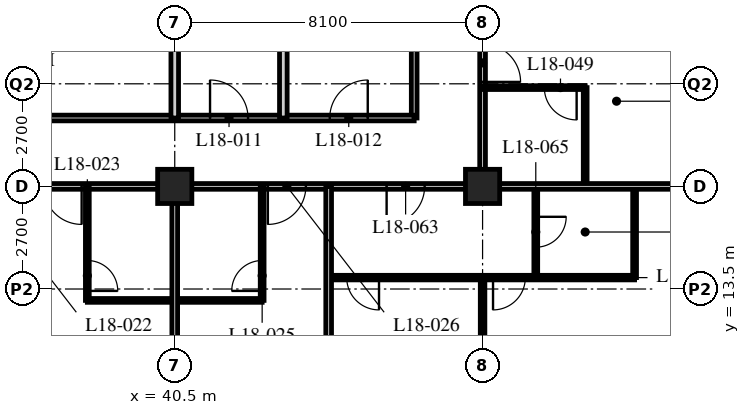
"""IFC4 building model, lengths in metres.
Left out: names, types, materials, properties, quantities, classifications, styles, units other than length and angle.
Written with IfcOpenShell. Run it as: python <this file> out.ifc"""

import sys

from ifc_helpers import new_model, si_unit, direction, frame, frame_2d, origin, origin_2d, place, context, subcontext, project, spatial, rectangle, hollow_rectangle, extrude, element, fill, save


model = new_model("IFC4")
c1 = context("Model", 3, precision=1e-05, world=origin(), true_north=direction((0.0, 1.0)))
c2 = subcontext(c1, "Body", "Model", "MODEL_VIEW")
j1 = project(units=[si_unit("LENGTHUNIT", "METRE"), si_unit("PLANEANGLEUNIT", "RADIAN")], contexts=[c1])
p1 = place(None, origin())
s1 = spatial("IfcSite", under=j1, at=p1, CompositionType="ELEMENT")
p2 = place(p1, origin())
s2 = spatial("IfcBuilding", under=s1, at=p2, CompositionType="ELEMENT")
p3 = place(p2, frame((0.0, 0.0, 73.8)))
s3 = spatial("IfcBuildingStorey", under=s2, at=p3, CompositionType="ELEMENT", Elevation=73.8)
for number, where, z_axis, x_axis in (
    (1, (40.5, 16.2, 0.0), (0.0, 0.0, 1.0), (1.0, 0.0, 0.0)),
    (2, (48.6, 16.2, 0.0), (0.0, 0.0, 1.0), (1.0, 0.0, 0.0)),
):
    element("IfcColumn", number, at=place(p3, frame(where, z_axis=z_axis, x_axis=x_axis)), inside=s3, PredefinedType="COLUMN", context=c2, shape_type="SweptSolid", body=[
        extrude(hollow_rectangle(XDim=0.9, YDim=0.9, WallThickness=0.09, at=origin_2d()), origin(), (0.0, 0.0, 1.0), 3.4),
    ])
p4 = place(p3, frame((12.15, 16.2, 0.0), z_axis=(0.0, 0.0, 1.0), x_axis=(1.0, 0.0, 0.0)))
e3 = element("IfcWall", 3, at=p4, inside=s3, PredefinedType="PARTITIONING", context=c2, shape_type="SweptSolid", body=[
    extrude(rectangle(XDim=36.45, YDim=0.15, at=frame_2d((18.225, 0.0))), origin(), (0.0, 0.0, 1.0), 2.578),
])
p5 = place(p4, frame((6.5, 0.0, 0.0)))
e4 = element("IfcOpeningElement", 4, at=p5, cuts=e3, PredefinedType="OPENING", context=c2, shape_type="SweptSolid", body=[
    extrude(rectangle(XDim=1.0, YDim=2.1, at=frame_2d((0.5, 1.05))), frame((0.0, 0.085, 0.0), z_axis=(0.0, -1.0, 0.0), x_axis=(1.0, 0.0, 0.0)), (0.0, 0.0, 1.0), 0.17),
])
p6 = place(p4, frame((8.4, 0.0, 0.0)))
e5 = element("IfcOpeningElement", 5, at=p6, cuts=e3, PredefinedType="OPENING", context=c2, shape_type="SweptSolid", body=[
    extrude(rectangle(XDim=1.0, YDim=2.1, at=frame_2d((0.5, 1.05))), frame((0.0, 0.085, 0.0), z_axis=(0.0, -1.0, 0.0), x_axis=(1.0, 0.0, 0.0)), (0.0, 0.0, 1.0), 0.17),
])
p7 = place(p4, frame((14.9, 0.0, 0.0)))
e6 = element("IfcOpeningElement", 6, at=p7, cuts=e3, PredefinedType="OPENING", context=c2, shape_type="SweptSolid", body=[
    extrude(rectangle(XDim=1.0, YDim=2.1, at=frame_2d((0.5, 1.05))), frame((0.0, 0.085, 0.0), z_axis=(0.0, -1.0, 0.0), x_axis=(1.0, 0.0, 0.0)), (0.0, 0.0, 1.0), 0.17),
])
p8 = place(p4, frame((16.5, 0.0, 0.0)))
e7 = element("IfcOpeningElement", 7, at=p8, cuts=e3, PredefinedType="OPENING", context=c2, shape_type="SweptSolid", body=[
    extrude(rectangle(XDim=1.0, YDim=2.1, at=frame_2d((0.5, 1.05))), frame((0.0, 0.085, 0.0), z_axis=(0.0, -1.0, 0.0), x_axis=(1.0, 0.0, 0.0)), (0.0, 0.0, 1.0), 0.17),
])
p9 = place(p4, frame((22.7, 0.0, 0.0)))
e8 = element("IfcOpeningElement", 8, at=p9, cuts=e3, PredefinedType="OPENING", context=c2, shape_type="SweptSolid", body=[
    extrude(rectangle(XDim=1.0, YDim=2.1, at=frame_2d((0.5, 1.05))), frame((0.0, 0.085, 0.0), z_axis=(0.0, -1.0, 0.0), x_axis=(1.0, 0.0, 0.0)), (0.0, 0.0, 1.0), 0.17),
])
p10 = place(p4, frame((24.9, 0.0, 0.0)))
e9 = element("IfcOpeningElement", 9, at=p10, cuts=e3, PredefinedType="OPENING", context=c2, shape_type="SweptSolid", body=[
    extrude(rectangle(XDim=1.0, YDim=2.1, at=frame_2d((0.5, 1.05))), frame((0.0, 0.085, 0.0), z_axis=(0.0, -1.0, 0.0), x_axis=(1.0, 0.0, 0.0)), (0.0, 0.0, 1.0), 0.17),
])
p11 = place(p4, frame((30.8, 0.0, 0.0)))
e10 = element("IfcOpeningElement", 10, at=p11, cuts=e3, PredefinedType="OPENING", context=c2, shape_type="SweptSolid", body=[
    extrude(rectangle(XDim=1.0, YDim=2.1, at=frame_2d((0.5, 1.05))), frame((0.0, 0.085, 0.0), z_axis=(0.0, -1.0, 0.0), x_axis=(1.0, 0.0, 0.0)), (0.0, 0.0, 1.0), 0.17),
])
p12 = place(p4, frame((1.525, 0.0, 0.0)))
e11 = element("IfcOpeningElement", 11, at=p12, cuts=e3, PredefinedType="OPENING", context=c2, shape_type="SweptSolid", body=[
    extrude(rectangle(XDim=1.0, YDim=2.1, at=frame_2d((0.5, 1.05))), frame((0.0, 0.085, 0.0), z_axis=(0.0, -1.0, 0.0), x_axis=(1.0, 0.0, 0.0)), (0.0, 0.0, 1.0), 0.17),
])
p13 = place(p4, frame((33.925, 0.0, 0.0)))
e12 = element("IfcOpeningElement", 12, at=p13, cuts=e3, PredefinedType="OPENING", context=c2, shape_type="SweptSolid", body=[
    extrude(rectangle(XDim=1.0, YDim=2.1, at=frame_2d((0.5, 1.05))), frame((0.0, 0.085, 0.0), z_axis=(0.0, -1.0, 0.0), x_axis=(1.0, 0.0, 0.0)), (0.0, 0.0, 1.0), 0.17),
])
p14 = place(p3, frame((48.6, 16.2, 0.0), z_axis=(0.0, 0.0, 1.0), x_axis=(0.0, 1.0, 0.0)))
e13 = element("IfcWall", 13, at=p14, inside=s3, PredefinedType="PARTITIONING", context=c2, shape_type="SweptSolid", body=[
    extrude(rectangle(XDim=26.1, YDim=0.15, at=frame_2d((13.05, 0.0))), origin(), (0.0, 0.0, 1.0), 2.578),
])
p15 = place(p14, frame((2.75, 0.0, 0.0)))
e14 = element("IfcOpeningElement", 14, at=p15, cuts=e13, PredefinedType="OPENING", context=c2, shape_type="SweptSolid", body=[
    extrude(rectangle(XDim=1.0, YDim=2.1, at=frame_2d((0.5, 1.05))), frame((0.0, 0.085, 0.0), z_axis=(0.0, -1.0, 0.0), x_axis=(1.0, 0.0, 0.0)), (0.0, 0.0, 1.0), 0.17),
])
p16 = place(p14, frame((4.65, 0.0, 0.0)))
e15 = element("IfcOpeningElement", 15, at=p16, cuts=e13, PredefinedType="OPENING", context=c2, shape_type="SweptSolid", body=[
    extrude(rectangle(XDim=1.0, YDim=2.1, at=frame_2d((0.5, 1.05))), frame((0.0, 0.085, 0.0), z_axis=(0.0, -1.0, 0.0), x_axis=(1.0, 0.0, 0.0)), (0.0, 0.0, 1.0), 0.17),
])
p17 = place(p14, frame((13.55, 0.0, 0.0)))
e16 = element("IfcOpeningElement", 16, at=p17, cuts=e13, PredefinedType="OPENING", context=c2, shape_type="SweptSolid", body=[
    extrude(rectangle(XDim=1.0, YDim=2.1, at=frame_2d((0.5, 1.05))), frame((0.0, 0.085, 0.0), z_axis=(0.0, -1.0, 0.0), x_axis=(1.0, 0.0, 0.0)), (0.0, 0.0, 1.0), 0.17),
])
p18 = place(p14, frame((21.65, 0.0, 0.0)))
e17 = element("IfcOpeningElement", 17, at=p18, cuts=e13, PredefinedType="OPENING", context=c2, shape_type="SweptSolid", body=[
    extrude(rectangle(XDim=1.0, YDim=2.1, at=frame_2d((0.5, 1.05))), frame((0.0, 0.085, 0.0), z_axis=(0.0, -1.0, 0.0), x_axis=(1.0, 0.0, 0.0)), (0.0, 0.0, 1.0), 0.17),
])
p19 = place(p3, frame((46.8, 18.0, 0.0), z_axis=(0.0, 0.0, 1.0), x_axis=(0.0, 1.0, 0.0)))
e18 = element("IfcWall", 18, at=p19, inside=s3, PredefinedType="PARTITIONING", context=c2, shape_type="SweptSolid", body=[
    extrude(rectangle(XDim=22.5, YDim=0.15, at=frame_2d((11.25, 0.0))), origin(), (0.0, 0.0, 1.0), 3.19),
])
p20 = place(p19, frame((7.229, 0.0, 0.0)))
e19 = element("IfcOpeningElement", 19, at=p20, cuts=e18, PredefinedType="OPENING", context=c2, shape_type="SweptSolid", body=[
    extrude(rectangle(XDim=1.0, YDim=2.1, at=frame_2d((0.5, 1.05))), frame((0.0, 0.085, 0.0), z_axis=(0.0, -1.0, 0.0), x_axis=(1.0, 0.0, 0.0)), (0.0, 0.0, 1.0), 0.17),
])
p21 = place(p19, frame((11.279, 0.0, 0.0)))
e20 = element("IfcOpeningElement", 20, at=p21, cuts=e18, PredefinedType="OPENING", context=c2, shape_type="SweptSolid", body=[
    extrude(rectangle(XDim=1.0, YDim=2.1, at=frame_2d((0.5, 1.05))), frame((0.0, 0.085, 0.0), z_axis=(0.0, -1.0, 0.0), x_axis=(1.0, 0.0, 0.0)), (0.0, 0.0, 1.0), 0.17),
])
p22 = place(p19, frame((14.7, 0.0, 0.0)))
e21 = element("IfcOpeningElement", 21, at=p22, cuts=e18, PredefinedType="OPENING", context=c2, shape_type="SweptSolid", body=[
    extrude(rectangle(XDim=1.0, YDim=2.1, at=frame_2d((0.5, 1.05))), frame((0.0, 0.085, 0.0), z_axis=(0.0, -1.0, 0.0), x_axis=(1.0, 0.0, 0.0)), (0.0, 0.0, 1.0), 0.17),
])
p23 = place(p19, frame((18.75, 0.0, 0.0)))
e22 = element("IfcOpeningElement", 22, at=p23, cuts=e18, PredefinedType="OPENING", context=c2, shape_type="SweptSolid", body=[
    extrude(rectangle(XDim=1.0, YDim=2.1, at=frame_2d((0.5, 1.05))), frame((0.0, 0.085, 0.0), z_axis=(0.0, -1.0, 0.0), x_axis=(1.0, 0.0, 0.0)), (0.0, 0.0, 1.0), 0.17),
])
p24 = place(p3, frame((29.56, 18.0, 0.0), z_axis=(0.0, 0.0, 1.0), x_axis=(1.0, 0.0, 0.0)))
e23 = element("IfcWall", 23, at=p24, inside=s3, PredefinedType="PARTITIONING", context=c2, shape_type="SweptSolid", body=[
    extrude(rectangle(XDim=17.24, YDim=0.15, at=frame_2d((8.62, 0.0))), origin(), (0.0, 0.0, 1.0), 3.19),
])
p25 = place(p24, frame((0.29, 0.0, 0.0)))
e24 = element("IfcOpeningElement", 24, at=p25, cuts=e23, PredefinedType="OPENING", context=c2, shape_type="SweptSolid", body=[
    extrude(rectangle(XDim=1.0, YDim=2.1, at=frame_2d((0.5, 1.05))), frame((0.0, 0.085, 0.0), z_axis=(0.0, -1.0, 0.0), x_axis=(1.0, 0.0, 0.0)), (0.0, 0.0, 1.0), 0.17),
])
p26 = place(p24, frame((5.765, 0.0, 0.0)))
e25 = element("IfcOpeningElement", 25, at=p26, cuts=e23, PredefinedType="OPENING", context=c2, shape_type="SweptSolid", body=[
    extrude(rectangle(XDim=1.0, YDim=2.1, at=frame_2d((0.5, 1.05))), frame((0.0, 0.085, 0.0), z_axis=(0.0, -1.0, 0.0), x_axis=(1.0, 0.0, 0.0)), (0.0, 0.0, 1.0), 0.17),
])
p27 = place(p24, frame((11.869, 0.0, 0.0)))
e26 = element("IfcOpeningElement", 26, at=p27, cuts=e23, PredefinedType="OPENING", context=c2, shape_type="SweptSolid", body=[
    extrude(rectangle(XDim=1.0, YDim=2.1, at=frame_2d((0.5, 1.05))), frame((0.0, 0.085, 0.0), z_axis=(0.0, -1.0, 0.0), x_axis=(1.0, 0.0, 0.0)), (0.0, 0.0, 1.0), 0.17),
])
p28 = place(p24, frame((15.019, 0.0, 0.0)))
e27 = element("IfcOpeningElement", 27, at=p28, cuts=e23, PredefinedType="OPENING", context=c2, shape_type="SweptSolid", body=[
    extrude(rectangle(XDim=1.0, YDim=2.1, at=frame_2d((0.5, 1.05))), frame((0.0, 0.085, 0.0), z_axis=(0.0, -1.0, 0.0), x_axis=(1.0, 0.0, 0.0)), (0.0, 0.0, 1.0), 0.17),
])
p29 = place(p3, frame((40.5, 18.0, 0.0), z_axis=(0.0, 0.0, 1.0), x_axis=(0.0, 1.0, 0.0)))
e28 = element("IfcWall", 28, at=p29, inside=s3, PredefinedType="SOLIDWALL", context=c2, shape_type="SweptSolid", body=[
    extrude(rectangle(XDim=6.3, YDim=0.2, at=frame_2d((3.15, 0.0))), origin(), (0.0, 0.0, 1.0), 2.578),
])
p30 = place(p3, frame((43.357, 18.0, 0.0), z_axis=(0.0, 0.0, 1.0), x_axis=(0.0, 1.0, 0.0)))
e29 = element("IfcWall", 29, at=p30, inside=s3, PredefinedType="SOLIDWALL", context=c2, shape_type="SweptSolid", body=[
    extrude(rectangle(XDim=6.3, YDim=0.2, at=frame_2d((3.15, 0.0))), origin(), (0.0, 0.0, 1.0), 3.19),
])
p31 = place(p3, frame((38.2, 13.2, 0.0), z_axis=(0.0, 0.0, 1.0), x_axis=(1.0, 0.0, 0.0)))
e30 = element("IfcWall", 30, at=p31, inside=s3, PredefinedType="PARTITIONING", context=c2, shape_type="SweptSolid", body=[
    extrude(rectangle(XDim=4.6, YDim=0.1, at=frame_2d((2.3, 0.0))), origin(), (0.0, 0.0, 1.0), 3.19),
])
p32 = place(p3, frame((38.2, 16.2, 0.0), z_axis=(0.0, 0.0, 1.0), x_axis=(0.0, -1.0, 0.0)))
e31 = element("IfcWall", 31, at=p32, inside=s3, PredefinedType="PARTITIONING", context=c2, shape_type="SweptSolid", body=[
    extrude(rectangle(XDim=3.0, YDim=0.1, at=frame_2d((1.5, 0.0))), origin(), (0.0, 0.0, 1.0), 3.19),
])
p33 = place(p32, frame((1.95, 0.0, 0.0)))
e32 = element("IfcOpeningElement", 32, at=p33, cuts=e31, PredefinedType="OPENING", context=c2, shape_type="SweptSolid", body=[
    extrude(rectangle(XDim=0.8, YDim=2.1, at=frame_2d((0.4, 1.05))), frame((0.0, 0.06, 0.0), z_axis=(0.0, -1.0, 0.0), x_axis=(1.0, 0.0, 0.0)), (0.0, 0.0, 1.0), 0.12),
])
p34 = place(p3, frame((40.5, 16.2, 0.0), z_axis=(0.0, 0.0, 1.0), x_axis=(0.0, -1.0, 0.0)))
e33 = element("IfcWall", 33, at=p34, inside=s3, PredefinedType="PARTITIONING", context=c2, shape_type="SweptSolid", body=[
    extrude(rectangle(XDim=15.9, YDim=0.15, at=frame_2d((7.95, 0.0))), origin(), (0.0, 0.0, 1.0), 2.578),
])
p35 = place(p3, frame((42.8, 16.2, 0.0), z_axis=(0.0, 0.0, 1.0), x_axis=(0.0, -1.0, 0.0)))
e34 = element("IfcWall", 34, at=p35, inside=s3, PredefinedType="PARTITIONING", context=c2, shape_type="SweptSolid", body=[
    extrude(rectangle(XDim=3.0, YDim=0.1, at=frame_2d((1.5, 0.0))), origin(), (0.0, 0.0, 1.0), 3.19),
])
p36 = place(p35, frame((1.95, 0.0, 0.0)))
e35 = element("IfcOpeningElement", 35, at=p36, cuts=e34, PredefinedType="OPENING", context=c2, shape_type="SweptSolid", body=[
    extrude(rectangle(XDim=0.8, YDim=2.1, at=frame_2d((0.4, 1.05))), frame((0.0, 0.06, 0.0), z_axis=(0.0, -1.0, 0.0), x_axis=(1.0, 0.0, 0.0)), (0.0, 0.0, 1.0), 0.12),
])
p37 = place(p3, frame((51.3, 16.2, 0.0), z_axis=(0.0, 0.0, 1.0), x_axis=(0.0, 1.0, 0.0)))
e36 = element("IfcWall", 36, at=p37, inside=s3, PredefinedType="PARTITIONING", context=c2, shape_type="SweptSolid", body=[
    extrude(rectangle(XDim=2.6, YDim=0.1, at=frame_2d((1.3, 0.0))), origin(), (0.0, 0.0, 1.0), 3.19),
])
p38 = place(p3, frame((48.6, 18.8, 0.0), z_axis=(0.0, 0.0, 1.0), x_axis=(1.0, 0.0, 0.0)))
e37 = element("IfcWall", 37, at=p38, inside=s3, PredefinedType="PARTITIONING", context=c2, shape_type="SweptSolid", body=[
    extrude(rectangle(XDim=2.7, YDim=0.1, at=frame_2d((1.35, 0.0))), origin(), (0.0, 0.0, 1.0), 3.19),
])
p39 = place(p38, frame((1.625, 0.0, 0.0)))
e38 = element("IfcOpeningElement", 38, at=p39, cuts=e37, PredefinedType="OPENING", context=c2, shape_type="SweptSolid", body=[
    extrude(rectangle(XDim=0.85, YDim=2.1, at=frame_2d((0.425, 1.05))), frame((0.0, 0.06, 0.0), z_axis=(0.0, -1.0, 0.0), x_axis=(1.0, 0.0, 0.0)), (0.0, 0.0, 1.0), 0.12),
])
p40 = place(p3, frame((44.55, 13.8, 0.0), z_axis=(0.0, 0.0, 1.0), x_axis=(1.0, 0.0, 0.0)))
e39 = element("IfcWall", 39, at=p40, inside=s3, PredefinedType="PARTITIONING", context=c2, shape_type="SweptSolid", body=[
    extrude(rectangle(XDim=8.05, YDim=0.12, at=frame_2d((4.025, 0.0))), origin(), (0.0, 0.0, 1.0), 3.19),
])
p41 = place(p40, frame((0.475, 0.0, 0.0)))
e40 = element("IfcOpeningElement", 40, at=p41, cuts=e39, PredefinedType="OPENING", context=c2, shape_type="SweptSolid", body=[
    extrude(rectangle(XDim=0.85, YDim=2.1, at=frame_2d((0.425, 1.05))), frame((0.0, 0.07, 0.0), z_axis=(0.0, -1.0, 0.0), x_axis=(1.0, 0.0, 0.0)), (0.0, 0.0, 1.0), 0.14),
])
p42 = place(p40, frame((4.325, 0.0, 0.0)))
e41 = element("IfcOpeningElement", 41, at=p42, cuts=e39, PredefinedType="OPENING", context=c2, shape_type="SweptSolid", body=[
    extrude(rectangle(XDim=0.85, YDim=2.1, at=frame_2d((0.425, 1.05))), frame((0.0, 0.07, 0.0), z_axis=(0.0, -1.0, 0.0), x_axis=(1.0, 0.0, 0.0)), (0.0, 0.0, 1.0), 0.14),
])
p43 = place(p3, frame((50.0, 16.2, 0.0), z_axis=(0.0, 0.0, 1.0), x_axis=(0.0, -1.0, 0.0)))
e42 = element("IfcWall", 42, at=p43, inside=s3, PredefinedType="PARTITIONING", context=c2, shape_type="SweptSolid", body=[
    extrude(rectangle(XDim=2.4, YDim=0.1, at=frame_2d((1.2, 0.0))), origin(), (0.0, 0.0, 1.0), 3.19),
])
p44 = place(p43, frame((0.8, 0.0, 0.0)))
e43 = element("IfcOpeningElement", 43, at=p44, cuts=e42, PredefinedType="OPENING", context=c2, shape_type="SweptSolid", body=[
    extrude(rectangle(XDim=0.8, YDim=2.1, at=frame_2d((0.4, 1.05))), frame((0.0, 0.06, 0.0), z_axis=(0.0, -1.0, 0.0), x_axis=(1.0, 0.0, 0.0)), (0.0, 0.0, 1.0), 0.12),
])
p45 = place(p3, frame((52.6, 16.2, 0.0), z_axis=(0.0, 0.0, 1.0), x_axis=(0.0, -1.0, 0.0)))
e44 = element("IfcWall", 44, at=p45, inside=s3, PredefinedType="PARTITIONING", context=c2, shape_type="SweptSolid", body=[
    extrude(rectangle(XDim=2.4, YDim=0.1, at=frame_2d((1.2, 0.0))), origin(), (0.0, 0.0, 1.0), 3.19),
])
p46 = place(p3, frame((48.6, 13.8, 0.0), z_axis=(0.0, 0.0, 1.0), x_axis=(0.0, -1.0, 0.0)))
e45 = element("IfcWall", 45, at=p46, inside=s3, PredefinedType="PARTITIONING", context=c2, shape_type="SweptSolid", body=[
    extrude(rectangle(XDim=9.45, YDim=0.12, at=frame_2d((4.725, 0.0))), origin(), (0.0, 0.0, 1.0), 2.578),
])
p47 = place(p3, frame((48.6, 16.2, 0.0), z_axis=(0.0, 0.0, 1.0), x_axis=(1.0, 0.0, 0.0)))
e46 = element("IfcWall", 46, at=p47, inside=s3, PredefinedType="PARTITIONING", context=c2, shape_type="SweptSolid", body=[
    extrude(rectangle(XDim=7.8, YDim=0.15, at=frame_2d((3.9, 0.0))), origin(), (0.0, 0.0, 1.0), 2.578),
])
p48 = place(p3, frame((44.55, 16.2, 0.0), z_axis=(0.0, 0.0, 1.0), x_axis=(0.0, -1.0, 0.0)))
e47 = element("IfcWall", 47, at=p48, inside=s3, PredefinedType="PARTITIONING", context=c2, shape_type="SweptSolid", body=[
    extrude(rectangle(XDim=15.9, YDim=0.15, at=frame_2d((7.95, 0.0))), origin(), (0.0, 0.0, 1.0), 3.19),
])
p49 = place(p27, origin())
e48 = element("IfcDoor", 48, at=p49, inside=s3, OperationType="SINGLE_SWING_LEFT", PredefinedType="DOOR", context=c2, shape_type="SweptSolid", body=[
    extrude(rectangle(XDim=1.0, YDim=2.1, at=frame_2d((0.5, 1.05))), frame((0.0, 0.025, 0.0), z_axis=(0.0, -1.0, 0.0), x_axis=(1.0, 0.0, 0.0)), (0.0, 0.0, 1.0), 0.05),
])
fill(e26, e48)
p50 = place(p28, origin())
e49 = element("IfcDoor", 49, at=p50, inside=s3, OperationType="SINGLE_SWING_RIGHT", PredefinedType="DOOR", context=c2, shape_type="SweptSolid", body=[
    extrude(rectangle(XDim=1.0, YDim=2.1, at=frame_2d((0.5, 1.05))), frame((0.0, 0.025, 0.0), z_axis=(0.0, -1.0, 0.0), x_axis=(1.0, 0.0, 0.0)), (0.0, 0.0, 1.0), 0.05),
])
fill(e27, e49)
p51 = place(p33, origin())
e50 = element("IfcDoor", 50, at=p51, inside=s3, OperationType="SINGLE_SWING_RIGHT", PredefinedType="DOOR", context=c2, shape_type="SweptSolid", body=[
    extrude(rectangle(XDim=0.8, YDim=2.1, at=frame_2d((0.4, 1.05))), frame((0.0, 0.025, 0.0), z_axis=(0.0, -1.0, 0.0), x_axis=(1.0, 0.0, 0.0)), (0.0, 0.0, 1.0), 0.05),
])
fill(e32, e50)
p52 = place(p10, origin())
e51 = element("IfcDoor", 51, at=p52, inside=s3, OperationType="SINGLE_SWING_LEFT", PredefinedType="DOOR", context=c2, shape_type="SweptSolid", body=[
    extrude(rectangle(XDim=1.0, YDim=2.1, at=frame_2d((0.5, 1.05))), frame((0.0, 0.025, 0.0), z_axis=(0.0, -1.0, 0.0), x_axis=(1.0, 0.0, 0.0)), (0.0, 0.0, 1.0), 0.05),
])
fill(e9, e51)
p53 = place(p36, origin())
e52 = element("IfcDoor", 52, at=p53, inside=s3, OperationType="SINGLE_SWING_LEFT", PredefinedType="DOOR", context=c2, shape_type="SweptSolid", body=[
    extrude(rectangle(XDim=0.8, YDim=2.1, at=frame_2d((0.4, 1.05))), frame((0.0, 0.025, 0.0), z_axis=(0.0, -1.0, 0.0), x_axis=(1.0, 0.0, 0.0)), (0.0, 0.0, 1.0), 0.05),
])
fill(e35, e52)
p54 = place(p11, origin())
e53 = element("IfcDoor", 53, at=p54, inside=s3, OperationType="SINGLE_SWING_RIGHT", PredefinedType="DOOR", context=c2, shape_type="SweptSolid", body=[
    extrude(rectangle(XDim=1.0, YDim=2.1, at=frame_2d((0.5, 1.05))), frame((0.0, 0.025, 0.0), z_axis=(0.0, -1.0, 0.0), x_axis=(1.0, 0.0, 0.0)), (0.0, 0.0, 1.0), 0.05),
])
fill(e10, e53)
p55 = place(p39, origin())
e54 = element("IfcDoor", 54, at=p55, inside=s3, OperationType="SINGLE_SWING_LEFT", PredefinedType="DOOR", context=c2, shape_type="SweptSolid", body=[
    extrude(rectangle(XDim=0.85, YDim=2.1, at=frame_2d((0.425, 1.05))), frame((0.0, 0.025, 0.0), z_axis=(0.0, -1.0, 0.0), x_axis=(1.0, 0.0, 0.0)), (0.0, 0.0, 1.0), 0.05),
])
fill(e38, e54)
p56 = place(p15, origin())
e55 = element("IfcDoor", 55, at=p56, inside=s3, OperationType="SINGLE_SWING_RIGHT", PredefinedType="DOOR", context=c2, shape_type="SweptSolid", body=[
    extrude(rectangle(XDim=1.0, YDim=2.1, at=frame_2d((0.5, 1.05))), frame((0.0, 0.025, 0.0), z_axis=(0.0, -1.0, 0.0), x_axis=(1.0, 0.0, 0.0)), (0.0, 0.0, 1.0), 0.05),
])
fill(e14, e55)
p57 = place(p13, origin())
e56 = element("IfcDoor", 56, at=p57, inside=s3, OperationType="SINGLE_SWING_RIGHT", PredefinedType="DOOR", context=c2, shape_type="SweptSolid", body=[
    extrude(rectangle(XDim=1.0, YDim=2.1, at=frame_2d((0.5, 1.05))), frame((0.0, 0.025, 0.0), z_axis=(0.0, -1.0, 0.0), x_axis=(1.0, 0.0, 0.0)), (0.0, 0.0, 1.0), 0.05),
])
fill(e12, e56)
p58 = place(p41, origin())
e57 = element("IfcDoor", 57, at=p58, inside=s3, OperationType="SINGLE_SWING_LEFT", PredefinedType="DOOR", context=c2, shape_type="SweptSolid", body=[
    extrude(rectangle(XDim=0.85, YDim=2.1, at=frame_2d((0.425, 1.05))), frame((0.0, 0.025, 0.0), z_axis=(0.0, -1.0, 0.0), x_axis=(1.0, 0.0, 0.0)), (0.0, 0.0, 1.0), 0.05),
])
fill(e40, e57)
p59 = place(p44, origin())
e58 = element("IfcDoor", 58, at=p59, inside=s3, OperationType="SINGLE_SWING_LEFT", PredefinedType="DOOR", context=c2, shape_type="SweptSolid", body=[
    extrude(rectangle(XDim=0.8, YDim=2.1, at=frame_2d((0.4, 1.05))), frame((0.0, 0.025, 0.0), z_axis=(0.0, -1.0, 0.0), x_axis=(1.0, 0.0, 0.0)), (0.0, 0.0, 1.0), 0.05),
])
fill(e43, e58)
p60 = place(p42, origin())
e59 = element("IfcDoor", 59, at=p60, inside=s3, OperationType="SINGLE_SWING_RIGHT", PredefinedType="DOOR", context=c2, shape_type="SweptSolid", body=[
    extrude(rectangle(XDim=0.85, YDim=2.1, at=frame_2d((0.425, 1.05))), frame((0.0, 0.025, 0.0), z_axis=(0.0, -1.0, 0.0), x_axis=(1.0, 0.0, 0.0)), (0.0, 0.0, 1.0), 0.05),
])
fill(e41, e59)
save(model, sys.argv[1])
